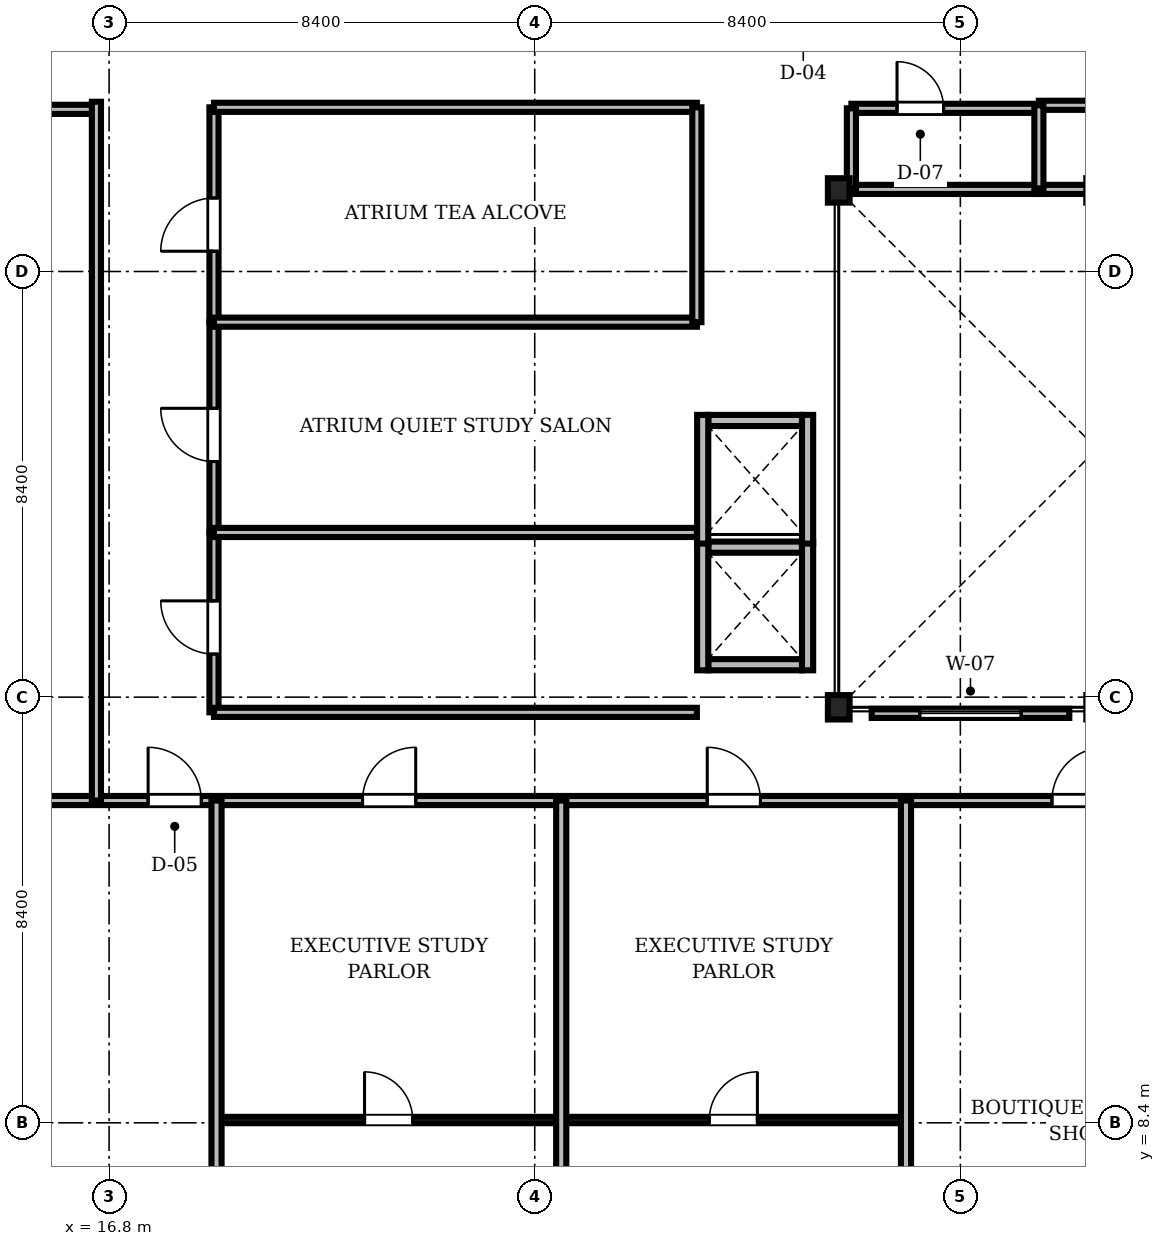
"""IFC4 building model, lengths in metres.
Left out: names, types, materials, properties, quantities, classifications, styles, units other than length and angle.
Written with IfcOpenShell. Run it as: python <this file> out.ifc"""

import sys

from ifc_helpers import new_model, si_unit, direction, frame, frame_2d, origin, origin_2d, place, context, subcontext, project, spatial, rectangle, i_section, extrude, source, transform, mapped, element, fill, save


model = new_model("IFC4")
c1 = context("Model", 3, precision=1e-05, world=origin(), true_north=direction((0.0, 1.0)))
c2 = subcontext(c1, "Body", "Model", "MODEL_VIEW")
j1 = project(units=[si_unit("LENGTHUNIT", "METRE"), si_unit("PLANEANGLEUNIT", "RADIAN")], contexts=[c1])
p1 = place(None, origin())
s1 = spatial("IfcSite", under=j1, at=p1, CompositionType="ELEMENT")
p2 = place(p1, origin())
s2 = spatial("IfcBuilding", under=s1, at=p2, CompositionType="ELEMENT")
p3 = place(p2, frame((0.0, 0.0, 78.7)))
s3 = spatial("IfcBuildingStorey", under=s2, at=p3, CompositionType="ELEMENT", Elevation=78.7)
m1 = source(origin(), c2, "Body", "SweptSolid", [
    extrude(i_section(OverallWidth=0.428, OverallDepth=0.481, WebThickness=0.04, FlangeThickness=0.063, FilletRadius=0.015, at=origin_2d()), origin(), (0.0, 0.0, 1.0), 3.41),
])
for number, where, z_axis, x_axis in (
    (1, (31.2, 16.6, 0.0), (0.0, 0.0, 1.0), (1.0, 0.0, 0.0)),
    (2, (31.2, 26.8, 0.0), (0.0, 0.0, 1.0), (1.0, 0.0, 0.0)),
):
    element("IfcColumn", number, at=place(p3, frame(where, z_axis=z_axis, x_axis=x_axis)), inside=s3, PredefinedType="COLUMN", context=c2, shape_type="MappedRepresentation", body=[
        mapped(m1, transform((0.0, 0.0, 0.0), scale=1.0)),
    ])
m2 = source(origin(), c2, "Body", "SweptSolid", [
    extrude(rectangle(XDim=1.85, YDim=0.22, at=frame_2d((0.925, 0.0))), origin(), (0.0, 0.0, 1.0), 3.41),
])
for number, where, z_axis, x_axis in (
    (3, (28.625, 17.44, 0.0), (0.0, 0.0, 1.0), (1.0, 0.0, 0.0)),
    (4, (28.625, 19.76, 0.0), (0.0, 0.0, 1.0), (1.0, 0.0, 0.0)),
):
    element("IfcWall", number, at=place(p3, frame(where, z_axis=z_axis, x_axis=x_axis)), inside=s3, PredefinedType="SOLIDWALL", context=c2, shape_type="MappedRepresentation", body=[
        mapped(m2, transform((0.0, 0.0, 0.0), scale=1.0)),
    ])
m3 = source(origin(), c2, "Body", "SweptSolid", [
    extrude(rectangle(XDim=2.54, YDim=0.22, at=frame_2d((1.27, 0.0))), origin(), (0.0, 0.0, 1.0), 3.41),
])
for number, where, z_axis, x_axis in (
    (5, (28.515, 17.33, 0.0), (0.0, 0.0, 1.0), (0.0, 1.0, 0.0)),
    (6, (30.585, 17.33, 0.0), (0.0, 0.0, 1.0), (0.0, 1.0, 0.0)),
):
    element("IfcWall", number, at=place(p3, frame(where, z_axis=z_axis, x_axis=x_axis)), inside=s3, PredefinedType="SOLIDWALL", context=c2, shape_type="MappedRepresentation", body=[
        mapped(m3, transform((0.0, 0.0, 0.0), scale=1.0)),
    ])
p4 = place(p3, frame((28.625, 22.26, 0.0), z_axis=(0.0, 0.0, 1.0), x_axis=(1.0, 0.0, 0.0)))
e7 = element("IfcWall", 7, at=p4, inside=s3, PredefinedType="SOLIDWALL", context=c2, shape_type="MappedRepresentation", body=[
    mapped(m2, transform((0.0, 0.0, 0.0), scale=1.0)),
])
for number, where, z_axis, x_axis in (
    (8, (28.515, 19.83, 0.0), (0.0, 0.0, 1.0), (0.0, 1.0, 0.0)),
    (9, (30.585, 19.83, 0.0), (0.0, 0.0, 1.0), (0.0, 1.0, 0.0)),
):
    element("IfcWall", number, at=place(p3, frame(where, z_axis=z_axis, x_axis=x_axis)), inside=s3, PredefinedType="SOLIDWALL", context=c2, shape_type="MappedRepresentation", body=[
        mapped(m3, transform((0.0, 0.0, 0.0), scale=1.0)),
    ])
m4 = source(origin(), c2, "Body", "SweptSolid", [
    extrude(rectangle(XDim=46.156, YDim=0.18, at=frame_2d((23.078, 0.0))), origin(), (0.0, 0.0, 1.0), 2.652),
])
p5 = place(p3, frame((2.422, 14.76, 0.0), z_axis=(0.0, 0.0, 1.0), x_axis=(1.0, 0.0, 0.0)))
e10 = element("IfcWall", 10, at=p5, inside=s3, PredefinedType="PARTITIONING", context=c2, shape_type="MappedRepresentation", body=[
    mapped(m4, transform((0.0, 0.0, 0.0), scale=1.0)),
])
m5 = source(origin(), c2, "Body", "SweptSolid", [
    extrude(rectangle(XDim=1.05, YDim=2.2, at=frame_2d((0.525, 1.1))), frame((0.0, 0.1, 0.0), z_axis=(0.0, -1.0, 0.0), x_axis=(1.0, 0.0, 0.0)), (0.0, 0.0, 1.0), 0.2),
])
p6 = place(p5, frame((15.148, 0.0, 0.0)))
e11 = element("IfcOpeningElement", 11, at=p6, cuts=e10, PredefinedType="OPENING", context=c2, shape_type="MappedRepresentation", body=[
    mapped(m5, transform((0.0, 0.0, 0.0), scale=1.0)),
])
p7 = place(p5, frame((19.38, 0.0, 0.0)))
e12 = element("IfcOpeningElement", 12, at=p7, cuts=e10, PredefinedType="OPENING", context=c2, shape_type="MappedRepresentation", body=[
    mapped(m5, transform((0.0, 0.0, 0.0), scale=1.0)),
])
p8 = place(p5, frame((26.183, 0.0, 0.0)))
e13 = element("IfcOpeningElement", 13, at=p8, cuts=e10, PredefinedType="OPENING", context=c2, shape_type="MappedRepresentation", body=[
    mapped(m5, transform((0.0, 0.0, 0.0), scale=1.0)),
])
p9 = place(p5, frame((32.986, 0.0, 0.0)))
e14 = element("IfcOpeningElement", 14, at=p9, cuts=e10, PredefinedType="OPENING", context=c2, shape_type="MappedRepresentation", body=[
    mapped(m5, transform((0.0, 0.0, 0.0), scale=1.0)),
])
p10 = place(p5, frame((40.998, 0.0, 0.0)))
e15 = element("IfcOpeningElement", 15, at=p10, cuts=e10, PredefinedType="OPENING", context=c2, shape_type="MappedRepresentation", body=[
    mapped(m5, transform((0.0, 0.0, 0.0), scale=1.0)),
])
m6 = source(origin(), c2, "Body", "SweptSolid", [
    extrude(rectangle(XDim=6.804, YDim=0.125, at=frame_2d((3.402, 0.0))), origin(), (0.0, 0.0, 1.0), 2.802),
])
p11 = place(p3, frame((25.723, 8.455, 0.0), z_axis=(0.0, 0.0, 1.0), x_axis=(1.0, 0.0, 0.0)))
e16 = element("IfcWall", 16, at=p11, inside=s3, PredefinedType="PARTITIONING", context=c2, shape_type="MappedRepresentation", body=[
    mapped(m6, transform((0.0, 0.0, 0.0), scale=1.0)),
])
m7 = source(origin(), c2, "Body", "SweptSolid", [
    extrude(rectangle(XDim=0.95, YDim=2.15, at=frame_2d((0.475, 1.075))), frame((0.0, 0.073, 0.0), z_axis=(0.0, -1.0, 0.0), x_axis=(1.0, 0.0, 0.0)), (0.0, 0.0, 1.0), 0.145),
])
p12 = place(p11, frame((2.922, 0.0, 0.0)))
e17 = element("IfcOpeningElement", 17, at=p12, cuts=e16, PredefinedType="OPENING", context=c2, shape_type="MappedRepresentation", body=[
    mapped(m7, transform((0.0, 0.0, 0.0), scale=1.0)),
])
m8 = source(origin(), c2, "Body", "SweptSolid", [
    extrude(rectangle(XDim=6.803, YDim=0.125, at=frame_2d((3.401, 0.0))), origin(), (0.0, 0.0, 1.0), 2.802),
])
p13 = place(p3, frame((18.92, 8.455, 0.0), z_axis=(0.0, 0.0, 1.0), x_axis=(1.0, 0.0, 0.0)))
e18 = element("IfcWall", 18, at=p13, inside=s3, PredefinedType="PARTITIONING", context=c2, shape_type="MappedRepresentation", body=[
    mapped(m8, transform((0.0, 0.0, 0.0), scale=1.0)),
])
p14 = place(p13, frame((2.922, 0.0, 0.0)))
e19 = element("IfcOpeningElement", 19, at=p14, cuts=e18, PredefinedType="OPENING", context=c2, shape_type="MappedRepresentation", body=[
    mapped(m7, transform((0.0, 0.0, 0.0), scale=1.0)),
])
m9 = source(origin(), c2, "Body", "SweptSolid", [
    extrude(rectangle(XDim=4.24, YDim=0.18, at=frame_2d((2.12, 0.0))), origin(), (0.0, 0.0, 1.0), 2.802),
])
p15 = place(p3, frame((18.87, 24.2, 0.0), z_axis=(0.0, 0.0, 1.0), x_axis=(0.0, 1.0, 0.0)))
e20 = element("IfcWall", 20, at=p15, inside=s3, PredefinedType="PARTITIONING", context=c2, shape_type="MappedRepresentation", body=[
    mapped(m9, transform((0.0, 0.0, 0.0), scale=1.0)),
])
p16 = place(p15, frame((1.4, 0.0, 0.0)))
e21 = element("IfcOpeningElement", 21, at=p16, cuts=e20, PredefinedType="OPENING", context=c2, shape_type="MappedRepresentation", body=[
    mapped(m5, transform((0.0, 0.0, 0.0), scale=1.0)),
])
m10 = source(origin(), c2, "Body", "SweptSolid", [
    extrude(rectangle(XDim=4.15, YDim=0.18, at=frame_2d((2.075, 0.0))), origin(), (0.0, 0.0, 1.0), 3.042),
])
p17 = place(p3, frame((18.87, 20.05, 0.0), z_axis=(0.0, 0.0, 1.0), x_axis=(0.0, 1.0, 0.0)))
e22 = element("IfcWall", 22, at=p17, inside=s3, PredefinedType="PARTITIONING", context=c2, shape_type="MappedRepresentation", body=[
    mapped(m10, transform((0.0, 0.0, 0.0), scale=1.0)),
])
p18 = place(p17, frame((1.4, 0.0, 0.0)))
e23 = element("IfcOpeningElement", 23, at=p18, cuts=e22, PredefinedType="OPENING", context=c2, shape_type="MappedRepresentation", body=[
    mapped(m5, transform((0.0, 0.0, 0.0), scale=1.0)),
])
m11 = source(origin(), c2, "Body", "SweptSolid", [
    extrude(rectangle(XDim=3.7, YDim=0.18, at=frame_2d((1.85, 0.0))), origin(), (0.0, 0.0, 1.0), 3.042),
])
p19 = place(p3, frame((31.45, 28.42, 0.0), z_axis=(0.0, 0.0, 1.0), x_axis=(1.0, 0.0, 0.0)))
e24 = element("IfcWall", 24, at=p19, inside=s3, PredefinedType="PARTITIONING", context=c2, shape_type="MappedRepresentation", body=[
    mapped(m11, transform((0.0, 0.0, 0.0), scale=1.0)),
])
m12 = source(origin(), c2, "Body", "SweptSolid", [
    extrude(rectangle(XDim=0.92, YDim=2.1, at=frame_2d((0.46, 1.05))), frame((0.0, 0.1, 0.0), z_axis=(0.0, -1.0, 0.0), x_axis=(1.0, 0.0, 0.0)), (0.0, 0.0, 1.0), 0.2),
])
p20 = place(p19, frame((0.9, 0.0, 0.0)))
e25 = element("IfcOpeningElement", 25, at=p20, cuts=e24, PredefinedType="OPENING", context=c2, shape_type="MappedRepresentation", body=[
    mapped(m12, transform((0.0, 0.0, 0.0), scale=1.0)),
])
m13 = source(origin(), c2, "Body", "SweptSolid", [
    extrude(rectangle(XDim=3.55, YDim=0.18, at=frame_2d((1.775, 0.0))), origin(), (0.0, 0.0, 1.0), 2.802),
])
p21 = place(p3, frame((18.87, 16.5, 0.0), z_axis=(0.0, 0.0, 1.0), x_axis=(0.0, 1.0, 0.0)))
e26 = element("IfcWall", 26, at=p21, inside=s3, PredefinedType="PARTITIONING", context=c2, shape_type="MappedRepresentation", body=[
    mapped(m13, transform((0.0, 0.0, 0.0), scale=1.0)),
])
p22 = place(p21, frame((1.15, 0.0, 0.0)))
e27 = element("IfcOpeningElement", 27, at=p22, cuts=e26, PredefinedType="OPENING", context=c2, shape_type="MappedRepresentation", body=[
    mapped(m5, transform((0.0, 0.0, 0.0), scale=1.0)),
])
m14 = source(origin(), c2, "Body", "SweptSolid", [
    extrude(rectangle(XDim=3.37, YDim=0.18, at=frame_2d((1.685, 0.0))), origin(), (0.0, 0.0, 1.0), 3.41),
])
p23 = place(p3, frame((35.15, 28.48, 0.0), z_axis=(0.0, 0.0, 1.0), x_axis=(1.0, 0.0, 0.0)))
e28 = element("IfcWall", 28, at=p23, inside=s3, PredefinedType="PARTITIONING", context=c2, shape_type="MappedRepresentation", body=[
    mapped(m14, transform((0.0, 0.0, 0.0), scale=1.0)),
])
m15 = source(origin(), c2, "Body", "SweptSolid", [
    extrude(rectangle(XDim=0.95, YDim=2.15, at=frame_2d((0.475, 1.075))), frame((0.0, 0.1, 0.0), z_axis=(0.0, -1.0, 0.0), x_axis=(1.0, 0.0, 0.0)), (0.0, 0.0, 1.0), 0.2),
])
p24 = place(p23, frame((1.775, 0.0, 0.0)))
e29 = element("IfcOpeningElement", 29, at=p24, cuts=e28, PredefinedType="OPENING", context=c2, shape_type="MappedRepresentation", body=[
    mapped(m15, transform((0.0, 0.0, 0.0), scale=1.0)),
])
m16 = source(origin(), c2, "Body", "SweptSolid", [
    extrude(rectangle(XDim=14.32, YDim=0.18, at=frame_2d((7.16, 0.0))), origin(), (0.0, 0.0, 1.0), 2.652),
])
p25 = place(p3, frame((2.23, 28.4, 0.0), z_axis=(0.0, 0.0, 1.0), x_axis=(1.0, 0.0, 0.0)))
e30 = element("IfcWall", 30, at=p25, inside=s3, PredefinedType="PARTITIONING", context=c2, shape_type="MappedRepresentation", body=[
    mapped(m16, transform((0.0, 0.0, 0.0), scale=1.0)),
])
m17 = source(origin(), c2, "Body", "SweptSolid", [
    extrude(rectangle(XDim=13.79, YDim=0.18, at=frame_2d((6.895, 0.0))), origin(), (0.0, 0.0, 1.0), 2.802),
])
p26 = place(p3, frame((16.55, 14.76, 0.0), z_axis=(0.0, 0.0, 1.0), x_axis=(0.0, 1.0, 0.0)))
e31 = element("IfcWall", 31, at=p26, inside=s3, PredefinedType="PARTITIONING", context=c2, shape_type="MappedRepresentation", body=[
    mapped(m17, transform((0.0, 0.0, 0.0), scale=1.0)),
])
m18 = source(origin(), c2, "Body", "SweptSolid", [
    extrude(rectangle(XDim=12.638, YDim=0.2, at=frame_2d((6.319, 0.0))), origin(), (0.0, 0.0, 1.0), 2.652),
])
p27 = place(p3, frame((18.92, 2.122, 0.0), z_axis=(0.0, 0.0, 1.0), x_axis=(0.0, 1.0, 0.0)))
e32 = element("IfcWall", 32, at=p27, inside=s3, PredefinedType="PARTITIONING", context=c2, shape_type="MappedRepresentation", body=[
    mapped(m18, transform((0.0, 0.0, 0.0), scale=1.0)),
])
m19 = source(origin(), c2, "Body", "SweptSolid", [
    extrude(rectangle(XDim=12.83, YDim=0.2, at=frame_2d((6.415, 0.0))), origin(), (0.0, 0.0, 1.0), 2.652),
])
p28 = place(p3, frame((25.723, 1.93, 0.0), z_axis=(0.0, 0.0, 1.0), x_axis=(0.0, 1.0, 0.0)))
e33 = element("IfcWall", 33, at=p28, inside=s3, PredefinedType="PARTITIONING", context=c2, shape_type="MappedRepresentation", body=[
    mapped(m19, transform((0.0, 0.0, 0.0), scale=1.0)),
])
p29 = place(p3, frame((32.527, 2.122, 0.0), z_axis=(0.0, 0.0, 1.0), x_axis=(0.0, 1.0, 0.0)))
e34 = element("IfcWall", 34, at=p29, inside=s3, PredefinedType="PARTITIONING", context=c2, shape_type="MappedRepresentation", body=[
    mapped(m18, transform((0.0, 0.0, 0.0), scale=1.0)),
])
m20 = source(origin(), c2, "Body", "SweptSolid", [
    extrude(rectangle(XDim=9.53, YDim=0.18, at=frame_2d((4.765, 0.0))), origin(), (0.0, 0.0, 1.0), 2.802),
])
p30 = place(p3, frame((18.87, 16.5, 0.0), z_axis=(0.0, 0.0, 1.0), x_axis=(1.0, 0.0, 0.0)))
e35 = element("IfcWall", 35, at=p30, inside=s3, PredefinedType="PARTITIONING", context=c2, shape_type="MappedRepresentation", body=[
    mapped(m20, transform((0.0, 0.0, 0.0), scale=1.0)),
])
m21 = source(origin(), c2, "Body", "SweptSolid", [
    extrude(rectangle(XDim=9.53, YDim=0.18, at=frame_2d((4.765, 0.0))), origin(), (0.0, 0.0, 1.0), 3.41),
])
for number, where, z_axis, x_axis in (
    (36, (18.87, 20.05, 0.0), (0.0, 0.0, 1.0), (1.0, 0.0, 0.0)),
    (37, (18.87, 24.2, 0.0), (0.0, 0.0, 1.0), (1.0, 0.0, 0.0)),
    (38, (18.87, 28.44, 0.0), (0.0, 0.0, 1.0), (1.0, 0.0, 0.0)),
):
    element("IfcWall", number, at=place(p3, frame(where, z_axis=z_axis, x_axis=x_axis)), inside=s3, PredefinedType="PARTITIONING", context=c2, shape_type="MappedRepresentation", body=[
        mapped(m21, transform((0.0, 0.0, 0.0), scale=1.0)),
    ])
p31 = place(p3, frame((28.4, 24.2, 0.0), z_axis=(0.0, 0.0, 1.0), x_axis=(0.0, 1.0, 0.0)))
e39 = element("IfcWall", 39, at=p31, inside=s3, PredefinedType="PARTITIONING", context=c2, shape_type="MappedRepresentation", body=[
    mapped(m9, transform((0.0, 0.0, 0.0), scale=1.0)),
])
m22 = source(origin(), c2, "Body", "SweptSolid", [
    extrude(rectangle(XDim=3.7, YDim=0.18, at=frame_2d((1.85, 0.0))), origin(), (0.0, 0.0, 1.0), 2.952),
])
p32 = place(p3, frame((31.45, 26.82, 0.0), z_axis=(0.0, 0.0, 1.0), x_axis=(1.0, 0.0, 0.0)))
e40 = element("IfcWall", 40, at=p32, inside=s3, PredefinedType="PARTITIONING", context=c2, shape_type="MappedRepresentation", body=[
    mapped(m22, transform((0.0, 0.0, 0.0), scale=1.0)),
])
m23 = source(origin(), c2, "Body", "SweptSolid", [
    extrude(rectangle(XDim=3.37, YDim=0.18, at=frame_2d((1.685, 0.0))), origin(), (0.0, 0.0, 1.0), 2.952),
])
p33 = place(p3, frame((35.15, 26.82, 0.0), z_axis=(0.0, 0.0, 1.0), x_axis=(1.0, 0.0, 0.0)))
e41 = element("IfcWall", 41, at=p33, inside=s3, PredefinedType="PARTITIONING", context=c2, shape_type="MappedRepresentation", body=[
    mapped(m23, transform((0.0, 0.0, 0.0), scale=1.0)),
])
m24 = source(origin(), c2, "Body", "SweptSolid", [
    extrude(rectangle(XDim=1.66, YDim=0.18, at=frame_2d((0.83, 0.0))), origin(), (0.0, 0.0, 1.0), 2.952),
])
p34 = place(p3, frame((35.15, 26.82, 0.0), z_axis=(0.0, 0.0, 1.0), x_axis=(0.0, 1.0, 0.0)))
e42 = element("IfcWall", 42, at=p34, inside=s3, PredefinedType="PARTITIONING", context=c2, shape_type="MappedRepresentation", body=[
    mapped(m24, transform((0.0, 0.0, 0.0), scale=1.0)),
])
m25 = source(origin(), c2, "Body", "SweptSolid", [
    extrude(rectangle(XDim=1.6, YDim=0.18, at=frame_2d((0.8, 0.0))), origin(), (0.0, 0.0, 1.0), 2.952),
])
p35 = place(p3, frame((31.45, 26.82, 0.0), z_axis=(0.0, 0.0, 1.0), x_axis=(0.0, 1.0, 0.0)))
e43 = element("IfcWall", 43, at=p35, inside=s3, PredefinedType="PARTITIONING", context=c2, shape_type="MappedRepresentation", body=[
    mapped(m25, transform((0.0, 0.0, 0.0), scale=1.0)),
])
m26 = source(origin(), c2, "Body", "SweptSolid", [
    extrude(rectangle(XDim=3.9, YDim=0.18, at=frame_2d((1.95, 0.0))), origin(), (0.0, 0.0, 1.0), 2.952),
])
p36 = place(p3, frame((31.85, 16.48, 0.0), z_axis=(0.0, 0.0, 1.0), x_axis=(1.0, 0.0, 0.0)))
e44 = element("IfcWall", 44, at=p36, inside=s3, PredefinedType="PARTITIONING", context=c2, shape_type="MappedRepresentation", body=[
    mapped(m26, transform((0.0, 0.0, 0.0), scale=1.0)),
])
m27 = source(origin(), c2, "Body", "SweptSolid", [
    extrude(rectangle(XDim=2.0, YDim=1.9, at=frame_2d((1.0, 0.95))), frame((0.0, 0.1, 0.0), z_axis=(0.0, -1.0, 0.0), x_axis=(1.0, 0.0, 0.0)), (0.0, 0.0, 1.0), 0.2),
])
p37 = place(p36, frame((0.95, 0.0, 0.55)))
e45 = element("IfcOpeningElement", 45, at=p37, cuts=e44, PredefinedType="OPENING", context=c2, shape_type="MappedRepresentation", body=[
    mapped(m27, transform((0.0, 0.0, 0.0), scale=1.0)),
])
m28 = source(origin(), c2, "Body", "SweptSolid", [
    extrude(rectangle(XDim=1.05, YDim=2.2, at=frame_2d((0.525, 1.1))), frame((0.0, 0.025, 0.0), z_axis=(0.0, -1.0, 0.0), x_axis=(1.0, 0.0, 0.0)), (0.0, 0.0, 1.0), 0.05),
])
p38 = place(p6, origin())
e46 = element("IfcDoor", 46, at=p38, inside=s3, OperationType="SINGLE_SWING_LEFT", PredefinedType="DOOR", context=c2, shape_type="MappedRepresentation", body=[
    mapped(m28, transform((0.0, 0.0, 0.0), scale=1.0)),
])
fill(e11, e46)
p39 = place(p7, origin())
e47 = element("IfcDoor", 47, at=p39, inside=s3, OperationType="SINGLE_SWING_RIGHT", PredefinedType="DOOR", context=c2, shape_type="MappedRepresentation", body=[
    mapped(m28, transform((0.0, 0.0, 0.0), scale=1.0)),
])
fill(e12, e47)
p40 = place(p8, origin())
e48 = element("IfcDoor", 48, at=p40, inside=s3, OperationType="SINGLE_SWING_LEFT", PredefinedType="DOOR", context=c2, shape_type="MappedRepresentation", body=[
    mapped(m28, transform((0.0, 0.0, 0.0), scale=1.0)),
])
fill(e13, e48)
p41 = place(p9, origin())
e49 = element("IfcDoor", 49, at=p41, inside=s3, OperationType="SINGLE_SWING_RIGHT", PredefinedType="DOOR", context=c2, shape_type="MappedRepresentation", body=[
    mapped(m28, transform((0.0, 0.0, 0.0), scale=1.0)),
])
fill(e14, e49)
m29 = source(origin(), c2, "Body", "SweptSolid", [
    extrude(rectangle(XDim=0.95, YDim=2.15, at=frame_2d((0.475, 1.075))), frame((0.0, 0.025, 0.0), z_axis=(0.0, -1.0, 0.0), x_axis=(1.0, 0.0, 0.0)), (0.0, 0.0, 1.0), 0.05),
])
p42 = place(p12, origin())
e50 = element("IfcDoor", 50, at=p42, inside=s3, OperationType="SINGLE_SWING_RIGHT", PredefinedType="DOOR", context=c2, shape_type="MappedRepresentation", body=[
    mapped(m29, transform((0.0, 0.0, 0.0), scale=1.0)),
])
fill(e17, e50)
p43 = place(p14, origin())
e51 = element("IfcDoor", 51, at=p43, inside=s3, OperationType="SINGLE_SWING_LEFT", PredefinedType="DOOR", context=c2, shape_type="MappedRepresentation", body=[
    mapped(m29, transform((0.0, 0.0, 0.0), scale=1.0)),
])
fill(e19, e51)
p44 = place(p16, origin())
e52 = element("IfcDoor", 52, at=p44, inside=s3, OperationType="SINGLE_SWING_LEFT", PredefinedType="DOOR", context=c2, shape_type="MappedRepresentation", body=[
    mapped(m28, transform((0.0, 0.0, 0.0), scale=1.0)),
])
fill(e21, e52)
p45 = place(p18, origin())
e53 = element("IfcDoor", 53, at=p45, inside=s3, OperationType="SINGLE_SWING_RIGHT", PredefinedType="DOOR", context=c2, shape_type="MappedRepresentation", body=[
    mapped(m28, transform((0.0, 0.0, 0.0), scale=1.0)),
])
fill(e23, e53)
m30 = source(origin(), c2, "Body", "SweptSolid", [
    extrude(rectangle(XDim=0.92, YDim=2.1, at=frame_2d((0.46, 1.05))), frame((0.0, 0.025, 0.0), z_axis=(0.0, -1.0, 0.0), x_axis=(1.0, 0.0, 0.0)), (0.0, 0.0, 1.0), 0.05),
])
p46 = place(p20, origin())
e54 = element("IfcDoor", 54, at=p46, inside=s3, OperationType="SINGLE_SWING_LEFT", PredefinedType="DOOR", context=c2, shape_type="MappedRepresentation", body=[
    mapped(m30, transform((0.0, 0.0, 0.0), scale=1.0)),
])
fill(e25, e54)
p47 = place(p22, origin())
e55 = element("IfcDoor", 55, at=p47, inside=s3, OperationType="SINGLE_SWING_RIGHT", PredefinedType="DOOR", context=c2, shape_type="MappedRepresentation", body=[
    mapped(m28, transform((0.0, 0.0, 0.0), scale=1.0)),
])
fill(e27, e55)
m31 = source(origin(), c2, "Body", "SweptSolid", [
    extrude(rectangle(XDim=2.0, YDim=1.9, at=frame_2d((1.0, 0.95))), frame((0.0, 0.03, 0.0), z_axis=(0.0, -1.0, 0.0), x_axis=(1.0, 0.0, 0.0)), (0.0, 0.0, 1.0), 0.06),
])
p48 = place(p37, origin())
e56 = element("IfcWindow", 56, at=p48, inside=s3, PartitioningType="SINGLE_PANEL", PredefinedType="WINDOW", context=c2, shape_type="MappedRepresentation", body=[
    mapped(m31, transform((0.0, 0.0, 0.0), scale=1.0)),
])
fill(e45, e56)
save(model, sys.argv[1])
